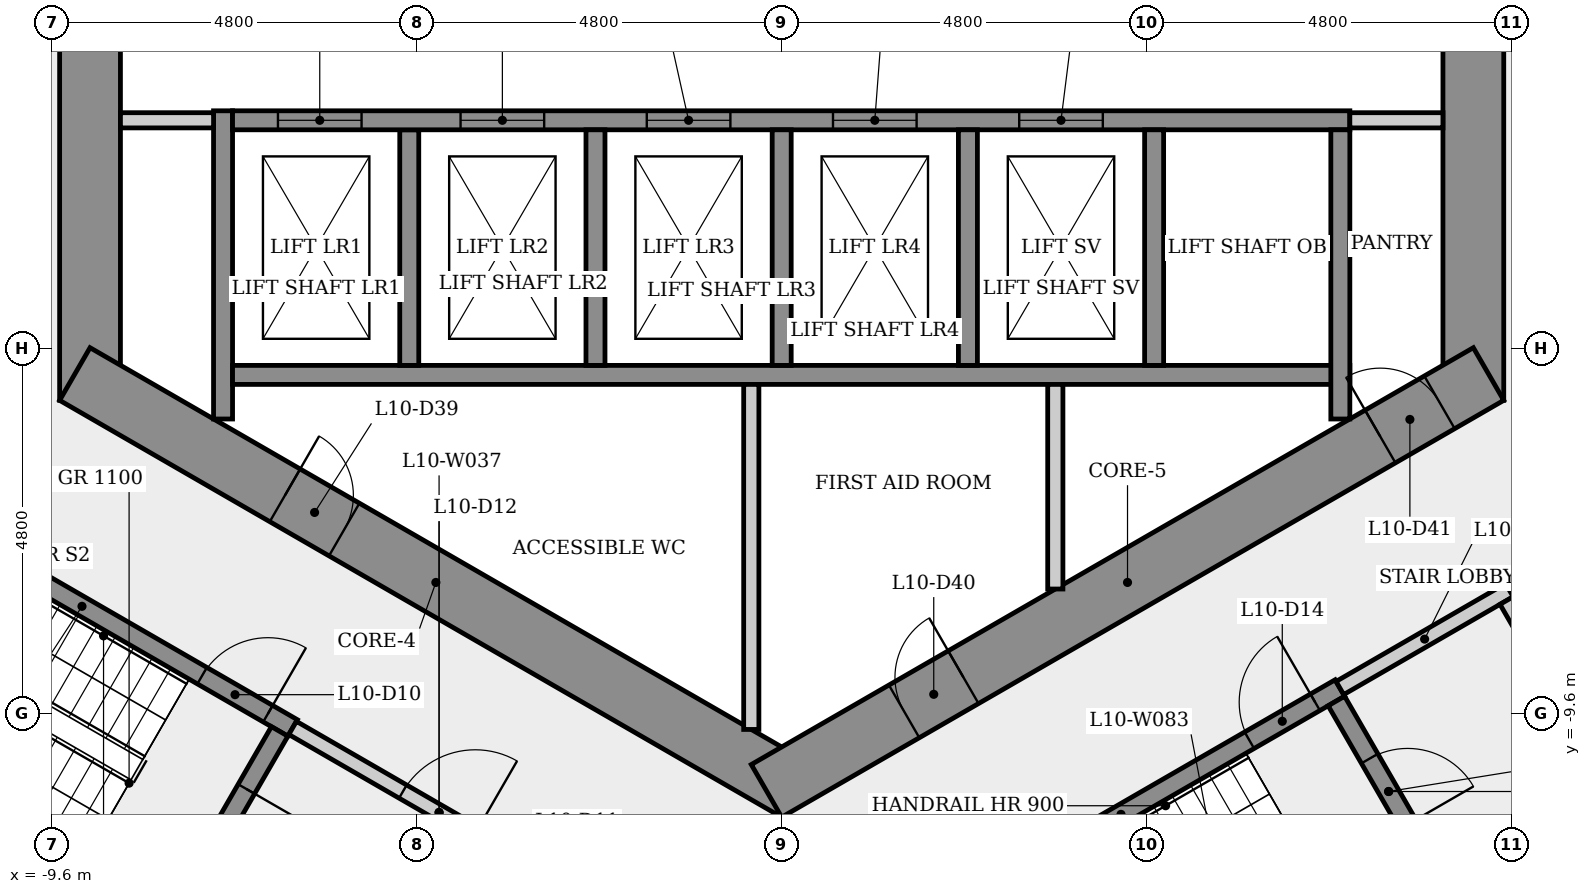
"""IFC4 building model, lengths in metres.
Left out: names, types, materials, properties, quantities, classifications, styles, units other than length and angle.
Written with IfcOpenShell. Run it as: python <this file> out.ifc"""

import sys

from ifc_helpers import new_model, si_unit, direction, frame, frame_2d, origin, place, context, subcontext, project, spatial, rectangle, extrude, element, fill, save


model = new_model("IFC4")
c1 = context("Model", 3, precision=1e-05, world=origin(), true_north=direction((0.0, 1.0)))
c2 = subcontext(c1, "Body", "Model", "MODEL_VIEW")
j1 = project(units=[si_unit("LENGTHUNIT", "METRE"), si_unit("PLANEANGLEUNIT", "RADIAN")], contexts=[c1])
p1 = place(None, origin())
s1 = spatial("IfcSite", under=j1, at=p1, CompositionType="ELEMENT")
p2 = place(p1, origin())
s2 = spatial("IfcBuilding", under=s1, at=p2, CompositionType="ELEMENT")
p3 = place(p2, frame((0.0, 0.0, 42.5)))
s3 = spatial("IfcBuildingStorey", under=s2, at=p3, CompositionType="ELEMENT", Elevation=42.5)
p4 = place(p3, frame((9.1, -5.485, 0.0), z_axis=(0.0, 0.0, 1.0), x_axis=(0.0, 1.0, 0.0)))
e1 = element("IfcWall", 1, at=p4, inside=s3, PredefinedType="SHEAR", context=c2, shape_type="SweptSolid", body=[
    extrude(rectangle(XDim=10.97, YDim=0.8, at=frame_2d((5.485, 0.0))), origin(), (0.0, 0.0, 1.0), 3.4),
])
p5 = place(p4, frame((4.685, 0.0, 0.0)))
e2 = element("IfcOpeningElement", 2, at=p5, cuts=e1, PredefinedType="OPENING", context=c2, shape_type="SweptSolid", body=[
    extrude(rectangle(XDim=1.6, YDim=2.1, at=frame_2d((0.8, 1.05))), frame((0.0, 0.41, 0.0), z_axis=(0.0, -1.0, 0.0), x_axis=(1.0, 0.0, 0.0)), (0.0, 0.0, 1.0), 0.82),
])
p6 = place(p3, frame((-9.1, 5.485, 0.0), z_axis=(0.0, 0.0, 1.0), x_axis=(0.0, -1.0, 0.0)))
e3 = element("IfcWall", 3, at=p6, inside=s3, PredefinedType="SHEAR", context=c2, shape_type="SweptSolid", body=[
    extrude(rectangle(XDim=10.97, YDim=0.8, at=frame_2d((5.485, 0.0))), origin(), (0.0, 0.0, 1.0), 3.4),
])
p7 = place(p6, frame((4.685, 0.0, 0.0)))
e4 = element("IfcOpeningElement", 4, at=p7, cuts=e3, PredefinedType="OPENING", context=c2, shape_type="SweptSolid", body=[
    extrude(rectangle(XDim=1.6, YDim=2.1, at=frame_2d((0.8, 1.05))), frame((0.0, 0.41, 0.0), z_axis=(0.0, -1.0, 0.0), x_axis=(1.0, 0.0, 0.0)), (0.0, 0.0, 1.0), 0.82),
])
p8 = place(p3, frame((-9.3, -5.138, 0.0), z_axis=(0.0, 0.0, 1.0), x_axis=(0.866023993627, -0.500002442456, 0.0)))
e5 = element("IfcWall", 5, at=p8, inside=s3, PredefinedType="SHEAR", context=c2, shape_type="SweptSolid", body=[
    extrude(rectangle(XDim=10.97, YDim=0.8, at=frame_2d((5.485, 0.0))), origin(), (0.0, 0.0, 1.0), 3.4),
])
p9 = place(p8, frame((3.192, 0.0, 0.0)))
e6 = element("IfcOpeningElement", 6, at=p9, cuts=e5, PredefinedType="OPENING", context=c2, shape_type="SweptSolid", body=[
    extrude(rectangle(XDim=0.9, YDim=2.1, at=frame_2d((0.45, 1.05))), frame((0.0, 0.41, 0.0), z_axis=(0.0, -1.0, 0.0), x_axis=(1.0, 0.0, 0.0)), (0.0, 0.0, 1.0), 0.82),
])
p10 = place(p3, frame((-0.2, -10.623, 0.0), z_axis=(0.0, 0.0, 1.0), x_axis=(0.866023993627, 0.500002442456, 0.0)))
e7 = element("IfcWall", 7, at=p10, inside=s3, PredefinedType="SHEAR", context=c2, shape_type="SweptSolid", body=[
    extrude(rectangle(XDim=10.97, YDim=0.8, at=frame_2d((5.485, 0.0))), origin(), (0.0, 0.0, 1.0), 3.4),
])
p11 = place(p10, frame((2.091, 0.0, 0.0)))
e8 = element("IfcOpeningElement", 8, at=p11, cuts=e7, PredefinedType="OPENING", context=c2, shape_type="SweptSolid", body=[
    extrude(rectangle(XDim=0.9, YDim=2.1, at=frame_2d((0.45, 1.05))), frame((0.0, 0.41, 0.0), z_axis=(0.0, -1.0, 0.0), x_axis=(1.0, 0.0, 0.0)), (0.0, 0.0, 1.0), 0.82),
])
p12 = place(p10, frame((9.325, 0.0, 0.0)))
e9 = element("IfcOpeningElement", 9, at=p12, cuts=e7, PredefinedType="OPENING", context=c2, shape_type="SweptSolid", body=[
    extrude(rectangle(XDim=0.9, YDim=2.1, at=frame_2d((0.45, 1.05))), frame((0.0, 0.41, 0.0), z_axis=(0.0, -1.0, 0.0), x_axis=(1.0, 0.0, 0.0)), (0.0, 0.0, 1.0), 0.82),
])
p13 = place(p3, frame((-11.977, -6.595, 0.0), z_axis=(0.0, 0.0, 1.0), x_axis=(0.866025499775, -0.499999833739, 0.0)))
e10 = element("IfcWall", 10, at=p13, inside=s3, PredefinedType="SHEAR", context=c2, shape_type="SweptSolid", body=[
    extrude(rectangle(XDim=6.4, YDim=0.25, at=frame_2d((3.2, 0.0))), origin(), (0.0, 0.0, 1.0), 3.05),
])
p14 = place(p13, frame((5.025, 0.0, 0.0)))
e11 = element("IfcOpeningElement", 11, at=p14, cuts=e10, PredefinedType="OPENING", context=c2, shape_type="SweptSolid", body=[
    extrude(rectangle(XDim=1.0, YDim=2.1, at=frame_2d((0.5, 1.05))), frame((0.0, 0.135, 0.0), z_axis=(0.0, -1.0, 0.0), x_axis=(1.0, 0.0, 0.0)), (0.0, 0.0, 1.0), 0.27),
])
p15 = place(p3, frame((-7.935, -12.393, 0.0), z_axis=(0.0, 0.0, 1.0), x_axis=(-0.866025499775, 0.499999833739, 0.0)))
e12 = element("IfcWall", 12, at=p15, inside=s3, PredefinedType="SHEAR", context=c2, shape_type="SweptSolid", body=[
    extrude(rectangle(XDim=6.4, YDim=0.25, at=frame_2d((3.2, 0.0))), origin(), (0.0, 0.0, 1.0), 3.05),
])
p16 = place(p3, frame((-7.35, -5.73, 0.0), z_axis=(0.0, 0.0, 1.0), x_axis=(0.0, 1.0, 0.0)))
e13 = element("IfcWall", 13, at=p16, inside=s3, PredefinedType="SHEAR", context=c2, shape_type="SweptSolid", body=[
    extrude(rectangle(XDim=4.055, YDim=0.25, at=frame_2d((2.028, 0.0))), origin(), (0.0, 0.0, 1.0), 3.05),
])
p17 = place(p3, frame((-7.475, -1.8, 0.0), z_axis=(0.0, 0.0, 1.0), x_axis=(-1.0, 0.0, 0.0)))
e14 = element("IfcWall", 14, at=p17, inside=s3, PredefinedType="PARTITIONING", context=c2, shape_type="SweptSolid", body=[
    extrude(rectangle(XDim=1.225, YDim=0.2, at=frame_2d((0.613, 0.0))), origin(), (0.0, 0.0, 1.0), 3.05),
])
p18 = place(p3, frame((-6.605, -9.841, 0.0), z_axis=(0.0, 0.0, 1.0), x_axis=(-0.499996545922, -0.866027397988, 0.0)))
e15 = element("IfcWall", 15, at=p18, inside=s3, PredefinedType="SHEAR", context=c2, shape_type="SweptSolid", body=[
    extrude(rectangle(XDim=2.75, YDim=0.25, at=frame_2d((1.375, 0.0))), origin(), (0.0, 0.0, 1.0), 3.05),
])
p19 = place(p18, frame((0.875, 0.0, 0.0)))
e16 = element("IfcOpeningElement", 16, at=p19, cuts=e15, PredefinedType="OPENING", context=c2, shape_type="SweptSolid", body=[
    extrude(rectangle(XDim=1.0, YDim=2.1, at=frame_2d((0.5, 1.05))), frame((0.0, 0.135, 0.0), z_axis=(0.0, -1.0, 0.0), x_axis=(1.0, 0.0, 0.0)), (0.0, 0.0, 1.0), 0.27),
])
p20 = place(p3, frame((-6.435, -9.795, 0.0), z_axis=(0.0, 0.0, 1.0), x_axis=(0.866012907634, -0.500021643343, 0.0)))
e17 = element("IfcWall", 17, at=p20, inside=s3, PredefinedType="PARTITIONING", context=c2, shape_type="SweptSolid", body=[
    extrude(rectangle(XDim=4.45, YDim=0.2, at=frame_2d((2.225, 0.0))), origin(), (0.0, 0.0, 1.0), 3.05),
])
p21 = place(p20, frame((1.675, 0.0, 0.0)))
e18 = element("IfcOpeningElement", 18, at=p21, cuts=e17, PredefinedType="OPENING", context=c2, shape_type="SweptSolid", body=[
    extrude(rectangle(XDim=1.1, YDim=2.1, at=frame_2d((0.55, 1.05))), frame((0.0, 0.11, 0.0), z_axis=(0.0, -1.0, 0.0), x_axis=(1.0, 0.0, 0.0)), (0.0, 0.0, 1.0), 0.22),
])
p22 = place(p3, frame((-7.225, -5.15, 0.0), z_axis=(0.0, 0.0, 1.0), x_axis=(1.0, 0.0, 0.0)))
e19 = element("IfcWall", 19, at=p22, inside=s3, PredefinedType="SHEAR", context=c2, shape_type="SweptSolid", body=[
    extrude(rectangle(XDim=14.7, YDim=0.25, at=frame_2d((7.35, 0.0))), origin(), (0.0, 0.0, 1.0), 3.05),
])
p23 = place(p3, frame((-4.9, -1.925, 0.0), z_axis=(0.0, 0.0, 1.0), x_axis=(0.0, -1.0, 0.0)))
e20 = element("IfcWall", 20, at=p23, inside=s3, PredefinedType="SHEAR", context=c2, shape_type="SweptSolid", body=[
    extrude(rectangle(XDim=3.1, YDim=0.25, at=frame_2d((1.55, 0.0))), origin(), (0.0, 0.0, 1.0), 3.4),
])
p24 = place(p3, frame((-7.225, -1.8, 0.0), z_axis=(0.0, 0.0, 1.0), x_axis=(1.0, 0.0, 0.0)))
e21 = element("IfcWall", 21, at=p24, inside=s3, PredefinedType="SHEAR", context=c2, shape_type="SweptSolid", body=[
    extrude(rectangle(XDim=14.7, YDim=0.25, at=frame_2d((7.35, 0.0))), origin(), (0.0, 0.0, 1.0), 3.05),
])
p25 = place(p24, frame((0.597, 0.0, 0.0)))
e22 = element("IfcOpeningElement", 22, at=p25, cuts=e21, PredefinedType="OPENING", context=c2, shape_type="SweptSolid", body=[
    extrude(rectangle(XDim=1.1, YDim=2.1, at=frame_2d((0.55, 1.05))), frame((0.0, 0.135, 0.0), z_axis=(0.0, -1.0, 0.0), x_axis=(1.0, 0.0, 0.0)), (0.0, 0.0, 1.0), 0.27),
])
p26 = place(p24, frame((3.0, 0.0, 0.0)))
e23 = element("IfcOpeningElement", 23, at=p26, cuts=e21, PredefinedType="OPENING", context=c2, shape_type="SweptSolid", body=[
    extrude(rectangle(XDim=1.1, YDim=2.1, at=frame_2d((0.55, 1.05))), frame((0.0, 0.135, 0.0), z_axis=(0.0, -1.0, 0.0), x_axis=(1.0, 0.0, 0.0)), (0.0, 0.0, 1.0), 0.27),
])
p27 = place(p24, frame((5.45, 0.0, 0.0)))
e24 = element("IfcOpeningElement", 24, at=p27, cuts=e21, PredefinedType="OPENING", context=c2, shape_type="SweptSolid", body=[
    extrude(rectangle(XDim=1.1, YDim=2.1, at=frame_2d((0.55, 1.05))), frame((0.0, 0.135, 0.0), z_axis=(0.0, -1.0, 0.0), x_axis=(1.0, 0.0, 0.0)), (0.0, 0.0, 1.0), 0.27),
])
p28 = place(p24, frame((7.9, 0.0, 0.0)))
e25 = element("IfcOpeningElement", 25, at=p28, cuts=e21, PredefinedType="OPENING", context=c2, shape_type="SweptSolid", body=[
    extrude(rectangle(XDim=1.1, YDim=2.1, at=frame_2d((0.55, 1.05))), frame((0.0, 0.135, 0.0), z_axis=(0.0, -1.0, 0.0), x_axis=(1.0, 0.0, 0.0)), (0.0, 0.0, 1.0), 0.27),
])
p29 = place(p24, frame((10.35, 0.0, 0.0)))
e26 = element("IfcOpeningElement", 26, at=p29, cuts=e21, PredefinedType="OPENING", context=c2, shape_type="SweptSolid", body=[
    extrude(rectangle(XDim=1.1, YDim=2.1, at=frame_2d((0.55, 1.05))), frame((0.0, 0.135, 0.0), z_axis=(0.0, -1.0, 0.0), x_axis=(1.0, 0.0, 0.0)), (0.0, 0.0, 1.0), 0.27),
])
p30 = place(p3, frame((-2.45, -1.925, 0.0), z_axis=(0.0, 0.0, 1.0), x_axis=(0.0, -1.0, 0.0)))
e27 = element("IfcWall", 27, at=p30, inside=s3, PredefinedType="SHEAR", context=c2, shape_type="SweptSolid", body=[
    extrude(rectangle(XDim=3.1, YDim=0.25, at=frame_2d((1.55, 0.0))), origin(), (0.0, 0.0, 1.0), 3.4),
])
p31 = place(p3, frame((-0.4, -5.275, 0.0), z_axis=(0.0, 0.0, 1.0), x_axis=(0.0, -1.0, 0.0)))
e28 = element("IfcWall", 28, at=p31, inside=s3, PredefinedType="PARTITIONING", context=c2, shape_type="SweptSolid", body=[
    extrude(rectangle(XDim=4.54, YDim=0.2, at=frame_2d((2.27, 0.0))), origin(), (0.0, 0.0, 1.0), 3.05),
])
p32 = place(p3, frame((0.0, -1.925, 0.0), z_axis=(0.0, 0.0, 1.0), x_axis=(0.0, -1.0, 0.0)))
e29 = element("IfcWall", 29, at=p32, inside=s3, PredefinedType="SHEAR", context=c2, shape_type="SweptSolid", body=[
    extrude(rectangle(XDim=3.1, YDim=0.25, at=frame_2d((1.55, 0.0))), origin(), (0.0, 0.0, 1.0), 3.4),
])
p33 = place(p3, frame((1.585, -12.595, 0.0), z_axis=(0.0, 0.0, 1.0), x_axis=(0.866036417653, 0.499980922934, 0.0)))
e30 = element("IfcWall", 30, at=p33, inside=s3, PredefinedType="SHEAR", context=c2, shape_type="SweptSolid", body=[
    extrude(rectangle(XDim=6.65, YDim=0.25, at=frame_2d((3.325, 0.0))), origin(), (0.0, 0.0, 1.0), 3.05),
])
p34 = place(p33, frame((5.275, 0.0, 0.0)))
e31 = element("IfcOpeningElement", 31, at=p34, cuts=e30, PredefinedType="OPENING", context=c2, shape_type="SweptSolid", body=[
    extrude(rectangle(XDim=1.0, YDim=2.1, at=frame_2d((0.5, 1.05))), frame((0.0, 0.135, 0.0), z_axis=(0.0, -1.0, 0.0), x_axis=(1.0, 0.0, 0.0)), (0.0, 0.0, 1.0), 0.27),
])
p35 = place(p3, frame((2.45, -1.925, 0.0), z_axis=(0.0, 0.0, 1.0), x_axis=(0.0, -1.0, 0.0)))
e32 = element("IfcWall", 32, at=p35, inside=s3, PredefinedType="SHEAR", context=c2, shape_type="SweptSolid", body=[
    extrude(rectangle(XDim=3.1, YDim=0.25, at=frame_2d((1.55, 0.0))), origin(), (0.0, 0.0, 1.0), 3.4),
])
p36 = place(p3, frame((3.6, -5.275, 0.0), z_axis=(0.0, 0.0, 1.0), x_axis=(0.0, -1.0, 0.0)))
e33 = element("IfcWall", 33, at=p36, inside=s3, PredefinedType="PARTITIONING", context=c2, shape_type="SweptSolid", body=[
    extrude(rectangle(XDim=2.692, YDim=0.2, at=frame_2d((1.346, 0.0))), origin(), (0.0, 0.0, 1.0), 3.05),
])
p37 = place(p3, frame((4.9, -1.925, 0.0), z_axis=(0.0, 0.0, 1.0), x_axis=(0.0, -1.0, 0.0)))
e34 = element("IfcWall", 34, at=p37, inside=s3, PredefinedType="SHEAR", context=c2, shape_type="SweptSolid", body=[
    extrude(rectangle(XDim=3.1, YDim=0.25, at=frame_2d((1.55, 0.0))), origin(), (0.0, 0.0, 1.0), 3.4),
])
p38 = place(p3, frame((7.298, -9.441, 0.0), z_axis=(0.0, 0.0, 1.0), x_axis=(0.500034990121, -0.866005201286, 0.0)))
e35 = element("IfcWall", 35, at=p38, inside=s3, PredefinedType="SHEAR", context=c2, shape_type="SweptSolid", body=[
    extrude(rectangle(XDim=2.75, YDim=0.25, at=frame_2d((1.375, 0.0))), origin(), (0.0, 0.0, 1.0), 3.05),
])
p39 = place(p38, frame((0.875, 0.0, 0.0)))
e36 = element("IfcOpeningElement", 36, at=p39, cuts=e35, PredefinedType="OPENING", context=c2, shape_type="SweptSolid", body=[
    extrude(rectangle(XDim=1.0, YDim=2.1, at=frame_2d((0.5, 1.05))), frame((0.0, 0.135, 0.0), z_axis=(0.0, -1.0, 0.0), x_axis=(1.0, 0.0, 0.0)), (0.0, 0.0, 1.0), 0.27),
])
p40 = place(p3, frame((7.344, -9.27, 0.0), z_axis=(0.0, 0.0, 1.0), x_axis=(0.866005588531, 0.500034319456, 0.0)))
e37 = element("IfcWall", 37, at=p40, inside=s3, PredefinedType="PARTITIONING", context=c2, shape_type="SweptSolid", body=[
    extrude(rectangle(XDim=2.575, YDim=0.2, at=frame_2d((1.288, 0.0))), origin(), (0.0, 0.0, 1.0), 3.05),
])
p41 = place(p3, frame((7.35, -1.925, 0.0), z_axis=(0.0, 0.0, 1.0), x_axis=(0.0, -1.0, 0.0)))
e38 = element("IfcWall", 38, at=p41, inside=s3, PredefinedType="SHEAR", context=c2, shape_type="SweptSolid", body=[
    extrude(rectangle(XDim=3.805, YDim=0.25, at=frame_2d((1.903, 0.0))), origin(), (0.0, 0.0, 1.0), 3.05),
])
p42 = place(p3, frame((8.7, -1.8, 0.0), z_axis=(0.0, 0.0, 1.0), x_axis=(-1.0, 0.0, 0.0)))
e39 = element("IfcWall", 39, at=p42, inside=s3, PredefinedType="PARTITIONING", context=c2, shape_type="SweptSolid", body=[
    extrude(rectangle(XDim=1.225, YDim=0.2, at=frame_2d((0.613, 0.0))), origin(), (0.0, 0.0, 1.0), 3.05),
])
p43 = place(p3, frame((9.537, -8.119, 0.0), z_axis=(0.0, 0.0, 1.0), x_axis=(0.499990139034, -0.866031096941, 0.0)))
e40 = element("IfcWall", 40, at=p43, inside=s3, PredefinedType="PARTITIONING", context=c2, shape_type="SweptSolid", body=[
    extrude(rectangle(XDim=3.0, YDim=0.2, at=frame_2d((1.5, 0.0))), origin(), (0.0, 0.0, 1.0), 3.05),
])
p44 = place(p43, frame((0.935, 0.0, 0.0)))
e41 = element("IfcOpeningElement", 41, at=p44, cuts=e40, PredefinedType="OPENING", context=c2, shape_type="SweptSolid", body=[
    extrude(rectangle(XDim=1.0, YDim=2.1, at=frame_2d((0.5, 1.05))), frame((0.0, 0.11, 0.0), z_axis=(0.0, -1.0, 0.0), x_axis=(1.0, 0.0, 0.0)), (0.0, 0.0, 1.0), 0.22),
])
p45 = place(p3, frame((10.901, -10.681, 0.0), z_axis=(0.0, 0.0, 1.0), x_axis=(-0.866009402589, -0.500027713859, 0.0)))
e42 = element("IfcWall", 42, at=p45, inside=s3, PredefinedType="PARTITIONING", context=c2, shape_type="SweptSolid", body=[
    extrude(rectangle(XDim=2.1, YDim=0.2, at=frame_2d((1.05, 0.0))), origin(), (0.0, 0.0, 1.0), 3.05),
])
p46 = place(p25, origin())
e43 = element("IfcDoor", 43, at=p46, inside=s3, OperationType="SLIDING_TO_LEFT", PredefinedType="DOOR", context=c2, shape_type="SweptSolid", body=[
    extrude(rectangle(XDim=1.1, YDim=2.1, at=frame_2d((0.55, 1.05))), frame((0.0, 0.025, 0.0), z_axis=(0.0, -1.0, 0.0), x_axis=(1.0, 0.0, 0.0)), (0.0, 0.0, 1.0), 0.05),
])
fill(e22, e43)
p47 = place(p26, origin())
e44 = element("IfcDoor", 44, at=p47, inside=s3, OperationType="SLIDING_TO_LEFT", PredefinedType="DOOR", context=c2, shape_type="SweptSolid", body=[
    extrude(rectangle(XDim=1.1, YDim=2.1, at=frame_2d((0.55, 1.05))), frame((0.0, 0.025, 0.0), z_axis=(0.0, -1.0, 0.0), x_axis=(1.0, 0.0, 0.0)), (0.0, 0.0, 1.0), 0.05),
])
fill(e23, e44)
p48 = place(p27, origin())
e45 = element("IfcDoor", 45, at=p48, inside=s3, OperationType="SLIDING_TO_LEFT", PredefinedType="DOOR", context=c2, shape_type="SweptSolid", body=[
    extrude(rectangle(XDim=1.1, YDim=2.1, at=frame_2d((0.55, 1.05))), frame((0.0, 0.025, 0.0), z_axis=(0.0, -1.0, 0.0), x_axis=(1.0, 0.0, 0.0)), (0.0, 0.0, 1.0), 0.05),
])
fill(e24, e45)
p49 = place(p28, origin())
e46 = element("IfcDoor", 46, at=p49, inside=s3, OperationType="SLIDING_TO_LEFT", PredefinedType="DOOR", context=c2, shape_type="SweptSolid", body=[
    extrude(rectangle(XDim=1.1, YDim=2.1, at=frame_2d((0.55, 1.05))), frame((0.0, 0.025, 0.0), z_axis=(0.0, -1.0, 0.0), x_axis=(1.0, 0.0, 0.0)), (0.0, 0.0, 1.0), 0.05),
])
fill(e25, e46)
p50 = place(p29, origin())
e47 = element("IfcDoor", 47, at=p50, inside=s3, OperationType="SLIDING_TO_LEFT", PredefinedType="DOOR", context=c2, shape_type="SweptSolid", body=[
    extrude(rectangle(XDim=1.1, YDim=2.1, at=frame_2d((0.55, 1.05))), frame((0.0, 0.025, 0.0), z_axis=(0.0, -1.0, 0.0), x_axis=(1.0, 0.0, 0.0)), (0.0, 0.0, 1.0), 0.05),
])
fill(e26, e47)
p51 = place(p14, origin())
e48 = element("IfcDoor", 48, at=p51, inside=s3, OperationType="SINGLE_SWING_RIGHT", PredefinedType="DOOR", context=c2, shape_type="SweptSolid", body=[
    extrude(rectangle(XDim=1.0, YDim=2.1, at=frame_2d((0.5, 1.05))), frame((0.0, 0.025, 0.0), z_axis=(0.0, -1.0, 0.0), x_axis=(1.0, 0.0, 0.0)), (0.0, 0.0, 1.0), 0.05),
])
fill(e11, e48)
p52 = place(p19, origin())
e49 = element("IfcDoor", 49, at=p52, inside=s3, OperationType="SINGLE_SWING_LEFT", PredefinedType="DOOR", context=c2, shape_type="SweptSolid", body=[
    extrude(rectangle(XDim=1.0, YDim=2.1, at=frame_2d((0.5, 1.05))), frame((0.0, 0.025, 0.0), z_axis=(0.0, -1.0, 0.0), x_axis=(1.0, 0.0, 0.0)), (0.0, 0.0, 1.0), 0.05),
])
fill(e16, e49)
p53 = place(p21, origin())
e50 = element("IfcDoor", 50, at=p53, inside=s3, OperationType="SINGLE_SWING_RIGHT", PredefinedType="DOOR", context=c2, shape_type="SweptSolid", body=[
    extrude(rectangle(XDim=1.1, YDim=2.1, at=frame_2d((0.55, 1.05))), frame((0.0, 0.025, 0.0), z_axis=(0.0, -1.0, 0.0), x_axis=(1.0, 0.0, 0.0)), (0.0, 0.0, 1.0), 0.05),
])
fill(e18, e50)
p54 = place(p34, origin())
e51 = element("IfcDoor", 51, at=p54, inside=s3, OperationType="SINGLE_SWING_RIGHT", PredefinedType="DOOR", context=c2, shape_type="SweptSolid", body=[
    extrude(rectangle(XDim=1.0, YDim=2.1, at=frame_2d((0.5, 1.05))), frame((0.0, 0.025, 0.0), z_axis=(0.0, -1.0, 0.0), x_axis=(1.0, 0.0, 0.0)), (0.0, 0.0, 1.0), 0.05),
])
fill(e31, e51)
p55 = place(p39, origin())
e52 = element("IfcDoor", 52, at=p55, inside=s3, OperationType="SINGLE_SWING_RIGHT", PredefinedType="DOOR", context=c2, shape_type="SweptSolid", body=[
    extrude(rectangle(XDim=1.0, YDim=2.1, at=frame_2d((0.5, 1.05))), frame((0.0, 0.025, 0.0), z_axis=(0.0, -1.0, 0.0), x_axis=(1.0, 0.0, 0.0)), (0.0, 0.0, 1.0), 0.05),
])
fill(e36, e52)
p56 = place(p9, origin())
e53 = element("IfcDoor", 53, at=p56, inside=s3, OperationType="SINGLE_SWING_LEFT", PredefinedType="DOOR", context=c2, shape_type="SweptSolid", body=[
    extrude(rectangle(XDim=0.9, YDim=2.1, at=frame_2d((0.45, 1.05))), frame((0.0, 0.025, 0.0), z_axis=(0.0, -1.0, 0.0), x_axis=(1.0, 0.0, 0.0)), (0.0, 0.0, 1.0), 0.05),
])
fill(e6, e53)
p57 = place(p11, origin())
e54 = element("IfcDoor", 54, at=p57, inside=s3, OperationType="SINGLE_SWING_RIGHT", PredefinedType="DOOR", context=c2, shape_type="SweptSolid", body=[
    extrude(rectangle(XDim=0.9, YDim=2.1, at=frame_2d((0.45, 1.05))), frame((0.0, 0.025, 0.0), z_axis=(0.0, -1.0, 0.0), x_axis=(1.0, 0.0, 0.0)), (0.0, 0.0, 1.0), 0.05),
])
fill(e8, e54)
p58 = place(p12, origin())
e55 = element("IfcDoor", 55, at=p58, inside=s3, OperationType="SINGLE_SWING_LEFT", PredefinedType="DOOR", context=c2, shape_type="SweptSolid", body=[
    extrude(rectangle(XDim=0.9, YDim=2.1, at=frame_2d((0.45, 1.05))), frame((0.0, 0.025, 0.0), z_axis=(0.0, -1.0, 0.0), x_axis=(1.0, 0.0, 0.0)), (0.0, 0.0, 1.0), 0.05),
])
fill(e9, e55)
save(model, sys.argv[1])
